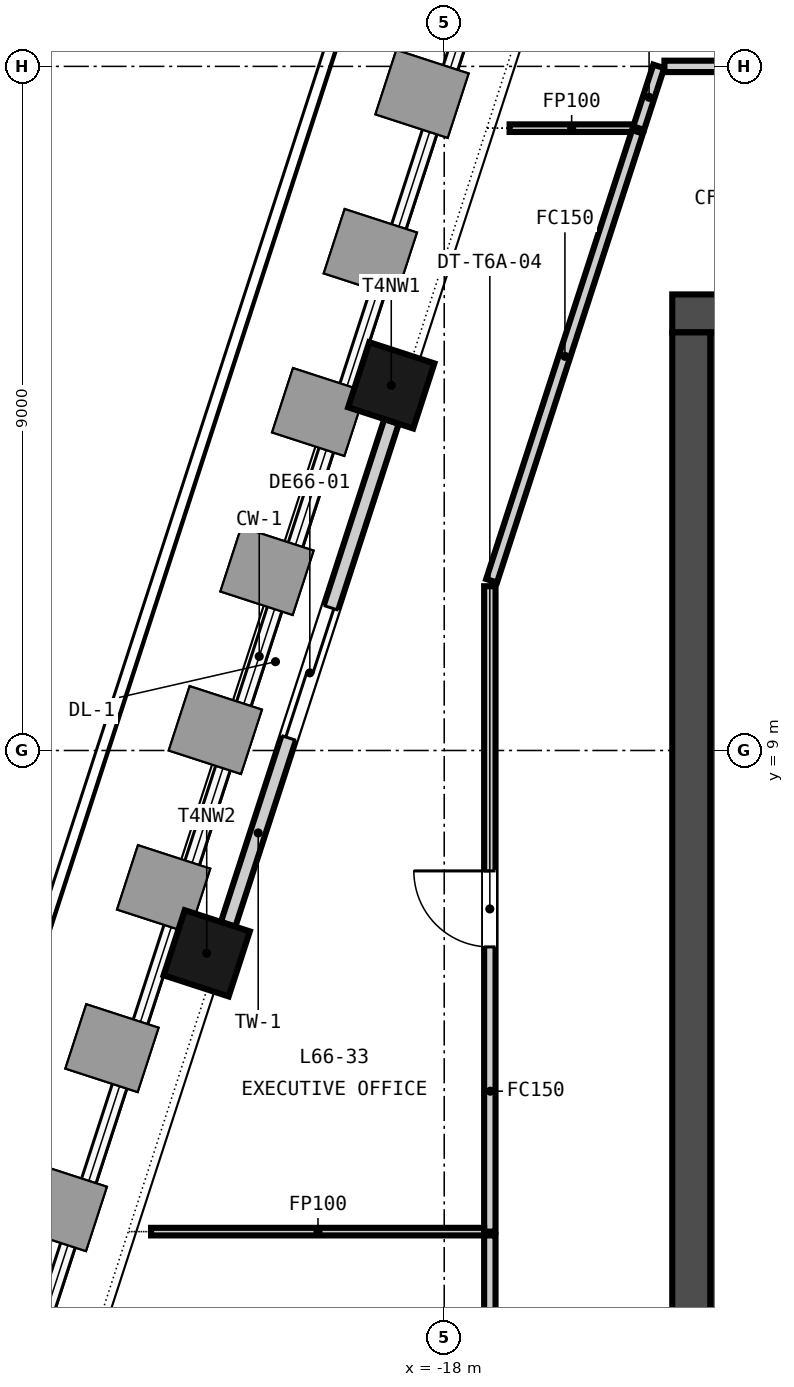
"""IFC4 building model, lengths in metres.
Left out: names, types, materials, properties, quantities, classifications, styles, units other than length and angle.
Written with IfcOpenShell. Run it as: python <this file> out.ifc"""

import sys

from ifc_helpers import new_model, si_unit, direction, frame, frame_2d, origin, origin_2d, place, context, subcontext, project, spatial, rectangle, extrude, element, fill, save


model = new_model("IFC4")
c1 = context("Model", 3, precision=1e-05, world=origin(), true_north=direction((0.0, 1.0)))
c2 = subcontext(c1, "Body", "Model", "MODEL_VIEW")
j1 = project(units=[si_unit("LENGTHUNIT", "METRE"), si_unit("PLANEANGLEUNIT", "RADIAN")], contexts=[c1])
p1 = place(None, origin())
s1 = spatial("IfcSite", under=j1, at=p1, CompositionType="ELEMENT")
p2 = place(p1, origin())
s2 = spatial("IfcBuilding", under=s1, at=p2, CompositionType="ELEMENT")
p3 = place(p2, frame((0.0, 0.0, 260.95)))
s3 = spatial("IfcBuildingStorey", under=s2, at=p3, CompositionType="ELEMENT", Elevation=260.95)
p4 = place(p3, frame((-15.0, 14.75, -0.15), z_axis=(0.0, 0.0, 1.0), x_axis=(1.0, 0.0, 0.0)))
e1 = element("IfcWall", 1, at=p4, inside=s3, PredefinedType="SOLIDWALL", context=c2, shape_type="SweptSolid", body=[
    extrude(rectangle(XDim=30.0, YDim=0.5, at=frame_2d((15.0, 0.0))), origin(), (0.0, 0.0, 1.0), 3.65),
])
p5 = place(p4, frame((9.25, 0.0, 0.15)))
e2 = element("IfcOpeningElement", 2, at=p5, cuts=e1, PredefinedType="OPENING", context=c2, shape_type="SweptSolid", body=[
    extrude(rectangle(XDim=1.5, YDim=2.1, at=frame_2d((0.75, 1.05))), frame((0.0, 0.26, 0.0), z_axis=(0.0, -1.0, 0.0), x_axis=(1.0, 0.0, 0.0)), (0.0, 0.0, 1.0), 0.52),
])
p6 = place(p4, frame((19.4, 0.0, 0.15)))
e3 = element("IfcOpeningElement", 3, at=p6, cuts=e1, PredefinedType="OPENING", context=c2, shape_type="SweptSolid", body=[
    extrude(rectangle(XDim=1.5, YDim=2.1, at=frame_2d((0.75, 1.05))), frame((0.0, 0.26, 0.0), z_axis=(0.0, -1.0, 0.0), x_axis=(1.0, 0.0, 0.0)), (0.0, 0.0, 1.0), 0.52),
])
p7 = place(p4, frame((1.5, 0.0, 0.15)))
e4 = element("IfcOpeningElement", 4, at=p7, cuts=e1, PredefinedType="OPENING", context=c2, shape_type="SweptSolid", body=[
    extrude(rectangle(XDim=1.2, YDim=2.1, at=frame_2d((0.6, 1.05))), frame((0.0, 0.26, 0.0), z_axis=(0.0, -1.0, 0.0), x_axis=(1.0, 0.0, 0.0)), (0.0, 0.0, 1.0), 0.52),
])
p8 = place(p4, frame((27.3, 0.0, 0.15)))
e5 = element("IfcOpeningElement", 5, at=p8, cuts=e1, PredefinedType="OPENING", context=c2, shape_type="SweptSolid", body=[
    extrude(rectangle(XDim=1.2, YDim=2.1, at=frame_2d((0.6, 1.05))), frame((0.0, 0.26, 0.0), z_axis=(0.0, -1.0, 0.0), x_axis=(1.0, 0.0, 0.0)), (0.0, 0.0, 1.0), 0.52),
])
p9 = place(p3, frame((-14.75, 0.5, -0.15), z_axis=(0.0, 0.0, 1.0), x_axis=(0.0, 1.0, 0.0)))
e6 = element("IfcWall", 6, at=p9, inside=s3, PredefinedType="SOLIDWALL", context=c2, shape_type="SweptSolid", body=[
    extrude(rectangle(XDim=14.0, YDim=0.5, at=frame_2d((7.0, 0.0))), origin(), (0.0, 0.0, 1.0), 3.65),
])
for number, where, z_axis, x_axis in (
    (7, (-18.697, 13.804, -0.15), (0.0, 0.0, 1.0), (-0.309, -0.951, 0.0)),
    (8, (-21.125, 6.331, -0.15), (0.0, 0.0, 1.0), (-0.309, -0.951, 0.0)),
):
    element("IfcColumn", number, at=place(p3, frame(where, z_axis=z_axis, x_axis=x_axis)), inside=s3, PredefinedType="COLUMN", context=c2, shape_type="SweptSolid", body=[
        extrude(rectangle(XDim=0.9, YDim=0.9, at=origin_2d()), origin(), (0.0, 0.0, 1.0), 3.65),
    ])
p10 = place(p3, frame((-18.693, 13.329, 0.0), z_axis=(0.0, 0.0, 1.0), x_axis=(-0.308996403545, -0.951063206415, 0.0)))
e9 = element("IfcWall", 9, at=p10, inside=s3, PredefinedType="SOLIDWALL", context=c2, shape_type="SweptSolid", body=[
    extrude(rectangle(XDim=6.957, YDim=0.2, at=frame_2d((3.479, 0.0))), origin(), (0.0, 0.0, 1.0), 2.85),
])
p11 = place(p10, frame((2.578, 0.0, 0.0)))
e10 = element("IfcOpeningElement", 10, at=p11, cuts=e9, PredefinedType="OPENING", context=c2, shape_type="SweptSolid", body=[
    extrude(rectangle(XDim=1.8, YDim=2.4, at=frame_2d((0.9, 1.2))), frame((0.0, 0.11, 0.0), z_axis=(0.0, -1.0, 0.0), x_axis=(1.0, 0.0, 0.0)), (0.0, 0.0, 1.0), 0.22),
])
p12 = place(p3, frame((-14.25, 0.5, 0.0), z_axis=(0.0, 0.0, 1.0), x_axis=(0.0, 1.0, 0.0)))
e11 = element("IfcWall", 11, at=p12, inside=s3, PredefinedType="SOLIDWALL", context=c2, shape_type="SweptSolid", body=[
    extrude(rectangle(XDim=14.0, YDim=0.5, at=frame_2d((7.0, 0.0))), origin(), (0.0, 0.0, 1.0), 3.5),
])
p13 = place(p3, frame((-15.442, 17.187, 0.0), z_axis=(0.0, 0.0, 1.0), x_axis=(0.308763129345, 0.951138964588, 0.0)))
e12 = element("IfcWall", 12, at=p13, inside=s3, PredefinedType="PARTITIONING", context=c2, shape_type="SweptSolid", body=[
    extrude(rectangle(XDim=0.855, YDim=0.15, at=frame_2d((0.427, 0.0))), origin(), (0.0, 0.0, 1.0), 2.751),
])
p14 = place(p3, frame((-15.103, 18.0, 0.0), z_axis=(0.0, 0.0, 1.0), x_axis=(1.0, 0.0, 0.0)))
e13 = element("IfcWall", 13, at=p14, inside=s3, PredefinedType="PARTITIONING", context=c2, shape_type="SweptSolid", body=[
    extrude(rectangle(XDim=14.928, YDim=0.15, at=frame_2d((7.464, 0.0))), origin(), (0.0, 0.0, 1.0), 2.751),
])
p15 = place(p14, frame((6.964, 0.0, 0.0)))
e14 = element("IfcOpeningElement", 14, at=p15, cuts=e13, PredefinedType="OPENING", context=c2, shape_type="SweptSolid", body=[
    extrude(rectangle(XDim=1.0, YDim=2.1, at=frame_2d((0.5, 1.05))), frame((0.0, 0.085, 0.0), z_axis=(0.0, -1.0, 0.0), x_axis=(1.0, 0.0, 0.0)), (0.0, 0.0, 1.0), 0.17),
])
p16 = place(p3, frame((-17.14, 17.187, 0.0), z_axis=(0.0, 0.0, 1.0), x_axis=(1.0, 0.0, 0.0)))
e15 = element("IfcWall", 15, at=p16, inside=s3, PredefinedType="PARTITIONING", context=c2, shape_type="SweptSolid", body=[
    extrude(rectangle(XDim=1.623, YDim=0.1, at=frame_2d((0.812, 0.0))), origin(), (0.0, 0.0, 1.0), 2.751),
])
p17 = place(p3, frame((-17.4, 2.67, 0.0), z_axis=(0.0, 0.0, 1.0), x_axis=(0.0, 1.0, 0.0)))
e16 = element("IfcWall", 16, at=p17, inside=s3, PredefinedType="PARTITIONING", context=c2, shape_type="SweptSolid", body=[
    extrude(rectangle(XDim=8.491, YDim=0.15, at=frame_2d((4.246, 0.0))), origin(), (0.0, 0.0, 1.0), 2.751),
])
p18 = place(p17, frame((3.746, 0.0, 0.0)))
e17 = element("IfcOpeningElement", 17, at=p18, cuts=e16, PredefinedType="OPENING", context=c2, shape_type="SweptSolid", body=[
    extrude(rectangle(XDim=1.0, YDim=2.1, at=frame_2d((0.5, 1.05))), frame((0.0, 0.085, 0.0), z_axis=(0.0, -1.0, 0.0), x_axis=(1.0, 0.0, 0.0)), (0.0, 0.0, 1.0), 0.17),
])
p19 = place(p3, frame((-17.377, 11.232, 0.0), z_axis=(0.0, 0.0, 1.0), x_axis=(0.309001632963, 0.951061507383, 0.0)))
e18 = element("IfcWall", 18, at=p19, inside=s3, PredefinedType="PARTITIONING", context=c2, shape_type="SweptSolid", body=[
    extrude(rectangle(XDim=6.211, YDim=0.15, at=frame_2d((3.105, 0.0))), origin(), (0.0, 0.0, 1.0), 2.751),
])
p20 = place(p3, frame((-21.857, 2.67, 0.0), z_axis=(0.0, 0.0, 1.0), x_axis=(1.0, 0.0, 0.0)))
e19 = element("IfcWall", 19, at=p20, inside=s3, PredefinedType="PARTITIONING", context=c2, shape_type="SweptSolid", body=[
    extrude(rectangle(XDim=4.382, YDim=0.1, at=frame_2d((2.191, 0.0))), origin(), (0.0, 0.0, 1.0), 2.751),
])
p21 = place(p3, frame((-17.4, -2.925, 0.0), z_axis=(0.0, 0.0, 1.0), x_axis=(0.0, 1.0, 0.0)))
e20 = element("IfcWall", 20, at=p21, inside=s3, PredefinedType="PARTITIONING", context=c2, shape_type="SweptSolid", body=[
    extrude(rectangle(XDim=5.545, YDim=0.15, at=frame_2d((2.772, 0.0))), origin(), (0.0, 0.0, 1.0), 2.751),
])
p22 = place(p21, frame((1.873, 0.0, 0.0)))
e21 = element("IfcOpeningElement", 21, at=p22, cuts=e20, PredefinedType="OPENING", context=c2, shape_type="SweptSolid", body=[
    extrude(rectangle(XDim=1.8, YDim=2.1, at=frame_2d((0.9, 1.05))), frame((0.0, 0.085, 0.0), z_axis=(0.0, -1.0, 0.0), x_axis=(1.0, 0.0, 0.0)), (0.0, 0.0, 1.0), 0.17),
])
p23 = place(p11, origin())
e22 = element("IfcDoor", 22, at=p23, inside=s3, OperationType="SINGLE_SWING_LEFT", PredefinedType="DOOR", context=c2, shape_type="SweptSolid", body=[
    extrude(rectangle(XDim=1.8, YDim=2.4, at=frame_2d((0.9, 1.2))), frame((0.0, 0.025, 0.0), z_axis=(0.0, -1.0, 0.0), x_axis=(1.0, 0.0, 0.0)), (0.0, 0.0, 1.0), 0.05),
])
fill(e10, e22)
p24 = place(p18, origin())
e23 = element("IfcDoor", 23, at=p24, inside=s3, OperationType="SINGLE_SWING_RIGHT", PredefinedType="DOOR", context=c2, shape_type="SweptSolid", body=[
    extrude(rectangle(XDim=1.0, YDim=2.1, at=frame_2d((0.5, 1.05))), frame((0.0, 0.025, 0.0), z_axis=(0.0, -1.0, 0.0), x_axis=(1.0, 0.0, 0.0)), (0.0, 0.0, 1.0), 0.05),
])
fill(e17, e23)
save(model, sys.argv[1])
